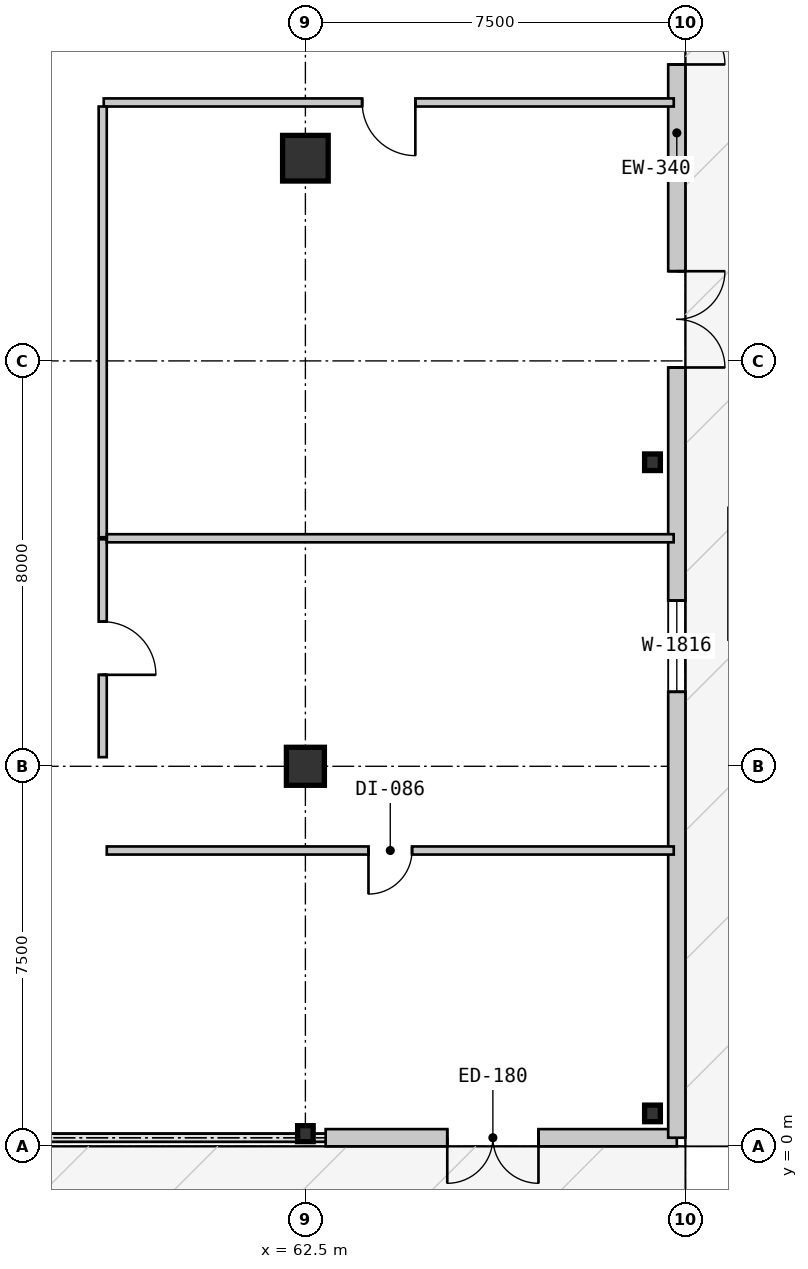
"""IFC4 building model, lengths in metres.
Left out: names, types, materials, properties, quantities, classifications, styles, units other than length and angle.
Written with IfcOpenShell. Run it as: python <this file> out.ifc"""

import sys

from ifc_helpers import new_model, si_unit, direction, frame, frame_2d, origin, origin_2d, place, context, subcontext, project, spatial, rectangle, circle, i_section, extrude, source, transform, mapped, element, fill, save


model = new_model("IFC4")
c1 = context("Model", 3, precision=1e-05, world=origin(), true_north=direction((0.0, 1.0)))
c2 = subcontext(c1, "Body", "Model", "MODEL_VIEW")
j1 = project(units=[si_unit("LENGTHUNIT", "METRE"), si_unit("PLANEANGLEUNIT", "RADIAN")], contexts=[c1])
p1 = place(None, origin())
s1 = spatial("IfcSite", under=j1, at=p1, CompositionType="ELEMENT")
p2 = place(p1, origin())
s2 = spatial("IfcBuilding", under=s1, at=p2, CompositionType="ELEMENT")
p3 = place(p2, origin())
s3 = spatial("IfcBuildingStorey", under=s2, at=p3, CompositionType="ELEMENT", Elevation=0.0)
m1 = source(origin(), c2, "Body", "SweptSolid", [
    extrude(circle(Radius=0.375, at=origin_2d()), origin(), (0.0, 0.0, 1.0), 4.55),
])
p4 = place(p3, frame((62.5, 7.5, 0.0), z_axis=(0.0, 0.0, 1.0), x_axis=(1.0, 0.0, 0.0)))
e1 = element("IfcColumn", 1, at=p4, inside=s3, PredefinedType="COLUMN", context=c2, shape_type="MappedRepresentation", body=[
    mapped(m1, transform((0.0, 0.0, 0.0), scale=1.0)),
])
m2 = source(origin(), c2, "Body", "SweptSolid", [
    extrude(circle(Radius=0.45, at=origin_2d()), origin(), (0.0, 0.0, 1.0), 4.55),
])
p5 = place(p3, frame((62.5, 19.5, 0.0), z_axis=(0.0, 0.0, 1.0), x_axis=(1.0, 0.0, 0.0)))
e2 = element("IfcColumn", 2, at=p5, inside=s3, PredefinedType="COLUMN", context=c2, shape_type="MappedRepresentation", body=[
    mapped(m2, transform((0.0, 0.0, 0.0), scale=1.0)),
])
m3 = source(origin(), c2, "Body", "SweptSolid", [
    extrude(i_section(OverallWidth=0.311, OverallDepth=0.327, WebThickness=0.016, FlangeThickness=0.025, at=origin_2d()), origin(), (0.0, 0.0, 1.0), 4.55),
])
for number, where, z_axis, x_axis in (
    (3, (69.35, 0.65, 0.0), (0.0, 0.0, 1.0), (1.0, 0.0, 0.0)),
    (4, (69.35, 13.5, 0.0), (0.0, 0.0, 1.0), (1.0, 0.0, 0.0)),
):
    element("IfcColumn", number, at=place(p3, frame(where, z_axis=z_axis, x_axis=x_axis)), inside=s3, PredefinedType="COLUMN", context=c2, shape_type="MappedRepresentation", body=[
        mapped(m3, transform((0.0, 0.0, 0.0), scale=1.0)),
    ])
m4 = source(origin(), c2, "Body", "SweptSolid", [
    extrude(i_section(OverallWidth=0.307, OverallDepth=0.315, WebThickness=0.012, FlangeThickness=0.019, at=origin_2d()), origin(), (0.0, 0.0, 1.0), 4.55),
])
p6 = place(p3, frame((62.5, 0.25, 0.0), z_axis=(0.0, 0.0, 1.0), x_axis=(1.0, 0.0, 0.0)))
e5 = element("IfcColumn", 5, at=p6, inside=s3, PredefinedType="PILASTER", context=c2, shape_type="MappedRepresentation", body=[
    mapped(m4, transform((0.0, 0.0, 0.0), scale=1.0)),
])
m5 = source(origin(), c2, "Body", "SweptSolid", [
    extrude(rectangle(XDim=6.93, YDim=0.34, at=frame_2d((3.465, 0.0))), origin(), (0.0, 0.0, 1.0), 4.29),
])
p7 = place(p3, frame((62.9, 0.17, 0.0), z_axis=(0.0, 0.0, 1.0), x_axis=(1.0, 0.0, 0.0)))
e6 = element("IfcWall", 6, at=p7, inside=s3, PredefinedType="SOLIDWALL", context=c2, shape_type="MappedRepresentation", body=[
    mapped(m5, transform((0.0, 0.0, 0.0), scale=1.0)),
])
m6 = source(origin(), c2, "Body", "SweptSolid", [
    extrude(rectangle(XDim=1.8, YDim=2.3, at=frame_2d((0.9, 1.15))), frame((0.0, 0.18, 0.0), z_axis=(0.0, -1.0, 0.0), x_axis=(1.0, 0.0, 0.0)), (0.0, 0.0, 1.0), 0.36),
])
p8 = place(p7, frame((2.4, 0.0, 0.0)))
e7 = element("IfcOpeningElement", 7, at=p8, cuts=e6, PredefinedType="OPENING", context=c2, shape_type="MappedRepresentation", body=[
    mapped(m6, transform((0.0, 0.0, 0.0), scale=1.0)),
])
m7 = source(origin(), c2, "Body", "SweptSolid", [
    extrude(rectangle(XDim=39.66, YDim=0.34, at=frame_2d((19.83, 0.0))), origin(), (0.0, 0.0, 1.0), 4.29),
])
p9 = place(p3, frame((69.83, 0.17, 0.0), z_axis=(0.0, 0.0, 1.0), x_axis=(0.0, 1.0, 0.0)))
e8 = element("IfcWall", 8, at=p9, inside=s3, PredefinedType="SOLIDWALL", context=c2, shape_type="MappedRepresentation", body=[
    mapped(m7, transform((0.0, 0.0, 0.0), scale=1.0)),
])
m8 = source(origin(), c2, "Body", "SweptSolid", [
    extrude(rectangle(XDim=1.9, YDim=2.4, at=frame_2d((0.95, 1.2))), frame((0.0, 0.18, 0.0), z_axis=(0.0, -1.0, 0.0), x_axis=(1.0, 0.0, 0.0)), (0.0, 0.0, 1.0), 0.36),
])
p10 = place(p9, frame((21.18, 0.0, 0.0)))
e9 = element("IfcOpeningElement", 9, at=p10, cuts=e8, PredefinedType="OPENING", context=c2, shape_type="MappedRepresentation", body=[
    mapped(m8, transform((0.0, 0.0, 0.0), scale=1.0)),
])
p11 = place(p9, frame((15.2, 0.0, 0.0)))
e10 = element("IfcOpeningElement", 10, at=p11, cuts=e8, PredefinedType="OPENING", context=c2, shape_type="MappedRepresentation", body=[
    mapped(m8, transform((0.0, 0.0, 0.0), scale=1.0)),
])
p12 = place(p9, frame((28.0, 0.0, 0.0)))
e11 = element("IfcOpeningElement", 11, at=p12, cuts=e8, PredefinedType="OPENING", context=c2, shape_type="MappedRepresentation", body=[
    mapped(m8, transform((0.0, 0.0, 0.0), scale=1.0)),
])
m9 = source(origin(), c2, "Body", "SweptSolid", [
    extrude(rectangle(XDim=1.8, YDim=1.6, at=frame_2d((0.9, 0.8))), frame((0.0, 0.18, 0.0), z_axis=(0.0, -1.0, 0.0), x_axis=(1.0, 0.0, 0.0)), (0.0, 0.0, 1.0), 0.36),
])
p13 = place(p9, frame((8.8, 0.0, 0.95)))
e12 = element("IfcOpeningElement", 12, at=p13, cuts=e8, PredefinedType="OPENING", context=c2, shape_type="MappedRepresentation", body=[
    mapped(m9, transform((0.0, 0.0, 0.0), scale=1.0)),
])
p14 = place(p9, frame((34.0, 0.0, 0.95)))
e13 = element("IfcOpeningElement", 13, at=p14, cuts=e8, PredefinedType="OPENING", context=c2, shape_type="MappedRepresentation", body=[
    mapped(m9, transform((0.0, 0.0, 0.0), scale=1.0)),
])
m10 = source(origin(), c2, "Body", "SweptSolid", [
    extrude(rectangle(XDim=4.3, YDim=0.16, at=frame_2d((2.15, 0.0))), origin(), (0.0, 0.0, 1.0), 4.29),
])
p15 = place(p3, frame((58.5, 11.98, 0.0), z_axis=(0.0, 0.0, 1.0), x_axis=(0.0, -1.0, 0.0)))
e14 = element("IfcWall", 14, at=p15, inside=s3, PredefinedType="PARTITIONING", context=c2, shape_type="MappedRepresentation", body=[
    mapped(m10, transform((0.0, 0.0, 0.0), scale=1.0)),
])
m11 = source(origin(), c2, "Body", "SweptSolid", [
    extrude(rectangle(XDim=1.05, YDim=2.1, at=frame_2d((0.525, 1.05))), frame((0.0, 0.09, 0.0), z_axis=(0.0, -1.0, 0.0), x_axis=(1.0, 0.0, 0.0)), (0.0, 0.0, 1.0), 0.18),
])
p16 = place(p15, frame((1.625, 0.0, 0.0)))
e15 = element("IfcOpeningElement", 15, at=p16, cuts=e14, PredefinedType="OPENING", context=c2, shape_type="MappedRepresentation", body=[
    mapped(m11, transform((0.0, 0.0, 0.0), scale=1.0)),
])
m12 = source(origin(), c2, "Body", "SweptSolid", [
    extrude(rectangle(XDim=11.25, YDim=0.16, at=frame_2d((5.625, 0.0))), origin(), (0.0, 0.0, 1.0), 4.29),
])
p17 = place(p3, frame((69.77, 20.6, 0.0), z_axis=(0.0, 0.0, 1.0), x_axis=(-1.0, 0.0, 0.0)))
e16 = element("IfcWall", 16, at=p17, inside=s3, PredefinedType="PARTITIONING", context=c2, shape_type="MappedRepresentation", body=[
    mapped(m12, transform((0.0, 0.0, 0.0), scale=1.0)),
])
p18 = place(p17, frame((5.1, 0.0, 0.0)))
e17 = element("IfcOpeningElement", 17, at=p18, cuts=e16, PredefinedType="OPENING", context=c2, shape_type="MappedRepresentation", body=[
    mapped(m11, transform((0.0, 0.0, 0.0), scale=1.0)),
])
m13 = source(origin(), c2, "Body", "SweptSolid", [
    extrude(rectangle(XDim=8.5, YDim=0.16, at=frame_2d((4.25, 0.0))), origin(), (0.0, 0.0, 1.0), 4.29),
])
p19 = place(p3, frame((58.5, 20.52, 0.0), z_axis=(0.0, 0.0, 1.0), x_axis=(0.0, -1.0, 0.0)))
e18 = element("IfcWall", 18, at=p19, inside=s3, PredefinedType="PARTITIONING", context=c2, shape_type="MappedRepresentation", body=[
    mapped(m13, transform((0.0, 0.0, 0.0), scale=1.0)),
])
m14 = source(origin(), c2, "Body", "SweptSolid", [
    extrude(rectangle(XDim=11.19, YDim=0.16, at=frame_2d((5.595, 0.0))), origin(), (0.0, 0.0, 1.0), 4.29),
])
p20 = place(p3, frame((58.58, 5.838, 0.0), z_axis=(0.0, 0.0, 1.0), x_axis=(1.0, 0.0, 0.0)))
e19 = element("IfcWall", 19, at=p20, inside=s3, PredefinedType="PARTITIONING", context=c2, shape_type="MappedRepresentation", body=[
    mapped(m14, transform((0.0, 0.0, 0.0), scale=1.0)),
])
m15 = source(origin(), c2, "Body", "SweptSolid", [
    extrude(rectangle(XDim=0.86, YDim=2.1, at=frame_2d((0.43, 1.05))), frame((0.0, 0.09, 0.0), z_axis=(0.0, -1.0, 0.0), x_axis=(1.0, 0.0, 0.0)), (0.0, 0.0, 1.0), 0.18),
])
p21 = place(p20, frame((5.165, 0.0, 0.0)))
e20 = element("IfcOpeningElement", 20, at=p21, cuts=e19, PredefinedType="OPENING", context=c2, shape_type="MappedRepresentation", body=[
    mapped(m15, transform((0.0, 0.0, 0.0), scale=1.0)),
])
m16 = source(origin(), c2, "Body", "SweptSolid", [
    extrude(rectangle(XDim=11.186, YDim=0.16, at=frame_2d((5.593, 0.0))), origin(), (0.0, 0.0, 1.0), 4.29),
])
p22 = place(p3, frame((58.582, 12.0, 0.0), z_axis=(0.0, 0.0, 1.0), x_axis=(1.0, 0.0, 0.0)))
e21 = element("IfcWall", 21, at=p22, inside=s3, PredefinedType="PARTITIONING", context=c2, shape_type="MappedRepresentation", body=[
    mapped(m16, transform((0.0, 0.0, 0.0), scale=1.0)),
])
m17 = source(origin(), c2, "Body", "SweptSolid", [
    extrude(rectangle(XDim=1.8, YDim=2.3, at=frame_2d((0.9, 1.15))), frame((0.0, 0.025, 0.0), z_axis=(0.0, -1.0, 0.0), x_axis=(1.0, 0.0, 0.0)), (0.0, 0.0, 1.0), 0.05),
])
p23 = place(p8, frame((1.8, 0.0, 0.0), z_axis=(0.0, 0.0, 1.0), x_axis=(-1.0, 0.0, 0.0)))
e22 = element("IfcDoor", 22, at=p23, inside=s3, OperationType="DOUBLE_DOOR_SINGLE_SWING", PredefinedType="DOOR", context=c2, shape_type="MappedRepresentation", body=[
    mapped(m17, transform((0.0, 0.0, 0.0), scale=1.0)),
])
fill(e7, e22)
m18 = source(origin(), c2, "Body", "SweptSolid", [
    extrude(rectangle(XDim=1.9, YDim=2.4, at=frame_2d((0.95, 1.2))), frame((0.0, 0.025, 0.0), z_axis=(0.0, -1.0, 0.0), x_axis=(1.0, 0.0, 0.0)), (0.0, 0.0, 1.0), 0.05),
])
p24 = place(p10, frame((1.9, 0.0, 0.0), z_axis=(0.0, 0.0, 1.0), x_axis=(-1.0, 0.0, 0.0)))
e23 = element("IfcDoor", 23, at=p24, inside=s3, OperationType="DOUBLE_DOOR_SINGLE_SWING", PredefinedType="DOOR", context=c2, shape_type="MappedRepresentation", body=[
    mapped(m18, transform((0.0, 0.0, 0.0), scale=1.0)),
])
fill(e9, e23)
p25 = place(p11, frame((1.9, 0.0, 0.0), z_axis=(0.0, 0.0, 1.0), x_axis=(-1.0, 0.0, 0.0)))
e24 = element("IfcDoor", 24, at=p25, inside=s3, OperationType="DOUBLE_DOOR_SINGLE_SWING", PredefinedType="DOOR", context=c2, shape_type="MappedRepresentation", body=[
    mapped(m18, transform((0.0, 0.0, 0.0), scale=1.0)),
])
fill(e10, e24)
m19 = source(origin(), c2, "Body", "SweptSolid", [
    extrude(rectangle(XDim=1.8, YDim=1.6, at=frame_2d((0.9, 0.8))), frame((0.0, 0.03, 0.0), z_axis=(0.0, -1.0, 0.0), x_axis=(1.0, 0.0, 0.0)), (0.0, 0.0, 1.0), 0.06),
])
p26 = place(p13, origin())
e25 = element("IfcWindow", 25, at=p26, inside=s3, PartitioningType="SINGLE_PANEL", PredefinedType="WINDOW", context=c2, shape_type="MappedRepresentation", body=[
    mapped(m19, transform((0.0, 0.0, 0.0), scale=1.0)),
])
fill(e12, e25)
m20 = source(origin(), c2, "Body", "SweptSolid", [
    extrude(rectangle(XDim=1.05, YDim=2.1, at=frame_2d((0.525, 1.05))), frame((0.0, 0.025, 0.0), z_axis=(0.0, -1.0, 0.0), x_axis=(1.0, 0.0, 0.0)), (0.0, 0.0, 1.0), 0.05),
])
p27 = place(p16, origin())
e26 = element("IfcDoor", 26, at=p27, inside=s3, OperationType="SINGLE_SWING_RIGHT", PredefinedType="DOOR", context=c2, shape_type="MappedRepresentation", body=[
    mapped(m20, transform((0.0, 0.0, 0.0), scale=1.0)),
])
fill(e15, e26)
p28 = place(p18, origin())
e27 = element("IfcDoor", 27, at=p28, inside=s3, OperationType="SINGLE_SWING_LEFT", PredefinedType="DOOR", context=c2, shape_type="MappedRepresentation", body=[
    mapped(m20, transform((0.0, 0.0, 0.0), scale=1.0)),
])
fill(e17, e27)
m21 = source(origin(), c2, "Body", "SweptSolid", [
    extrude(rectangle(XDim=0.86, YDim=2.1, at=frame_2d((0.43, 1.05))), frame((0.0, 0.025, 0.0), z_axis=(0.0, -1.0, 0.0), x_axis=(1.0, 0.0, 0.0)), (0.0, 0.0, 1.0), 0.05),
])
p29 = place(p21, frame((0.86, 0.0, 0.0), z_axis=(0.0, 0.0, 1.0), x_axis=(-1.0, 0.0, 0.0)))
e28 = element("IfcDoor", 28, at=p29, inside=s3, OperationType="SINGLE_SWING_RIGHT", PredefinedType="DOOR", context=c2, shape_type="MappedRepresentation", body=[
    mapped(m21, transform((0.0, 0.0, 0.0), scale=1.0)),
])
fill(e20, e28)
save(model, sys.argv[1])
